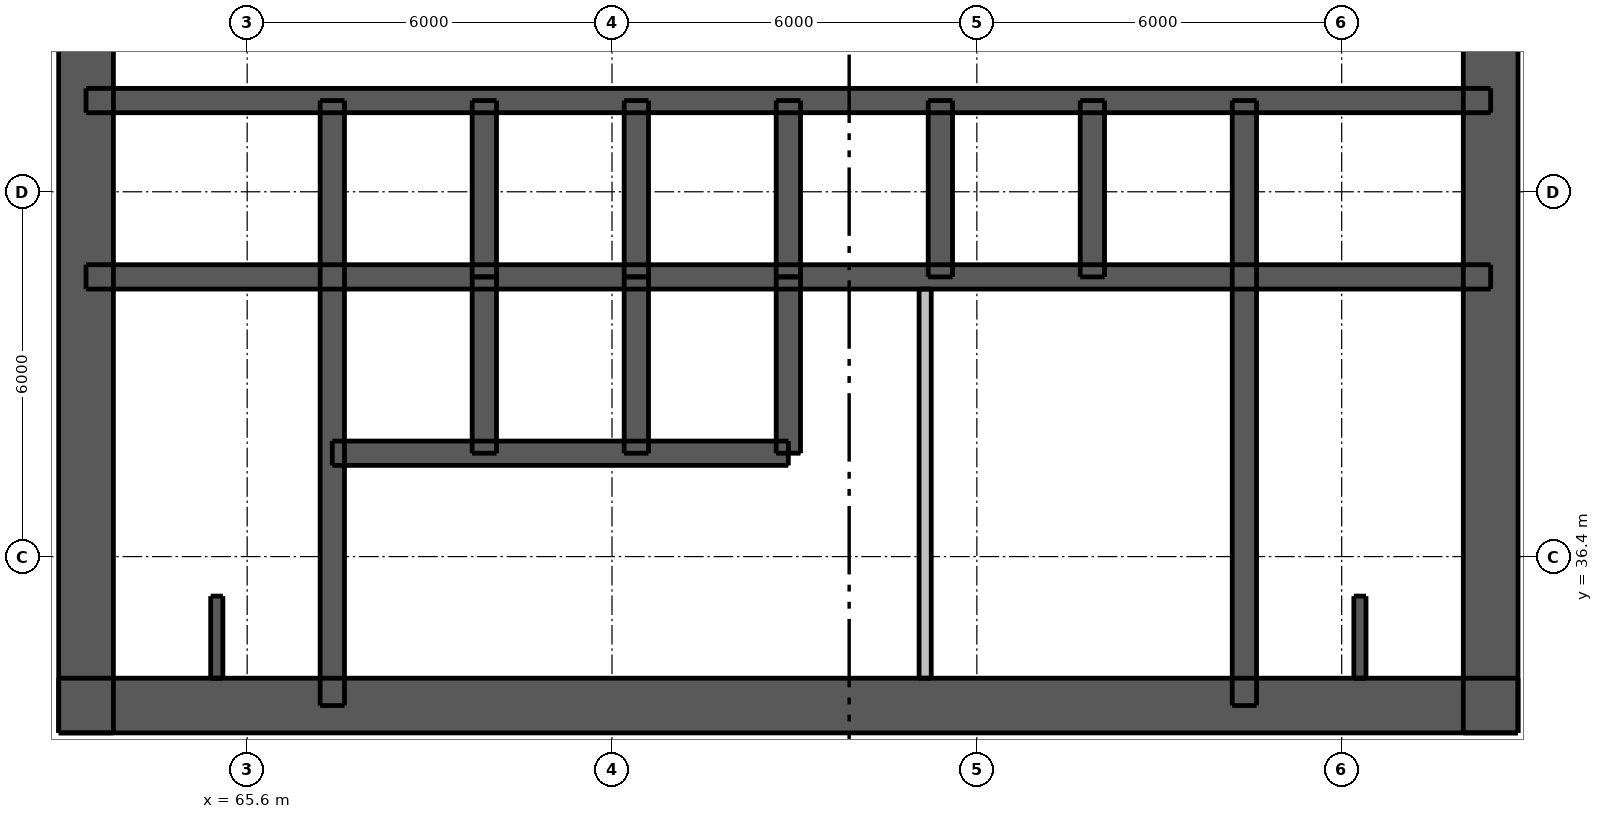
"""IFC4 building model, lengths in metres.
Left out: names, types, materials, properties, quantities, classifications, styles, units other than length and angle.
Written with IfcOpenShell. Run it as: python <this file> out.ifc"""

import sys

from ifc_helpers import new_model, si_unit, direction, frame, frame_2d, origin, place, context, subcontext, project, spatial, rectangle, extrude, element, fill, save


model = new_model("IFC4")
c1 = context("Model", 3, precision=1e-05, world=origin(), true_north=direction((0.0, 1.0)))
c2 = subcontext(c1, "Body", "Model", "MODEL_VIEW")
j1 = project(units=[si_unit("LENGTHUNIT", "METRE"), si_unit("PLANEANGLEUNIT", "RADIAN")], contexts=[c1])
p1 = place(None, origin())
s1 = spatial("IfcSite", under=j1, at=p1, CompositionType="ELEMENT")
p2 = place(p1, origin())
s2 = spatial("IfcBuilding", under=s1, at=p2, CompositionType="ELEMENT")
p3 = place(p2, frame((0.0, 0.0, 69.7)))
s3 = spatial("IfcBuildingStorey", under=s2, at=p3, CompositionType="ELEMENT", Elevation=69.7)
p4 = place(p3, frame((62.5, 33.95, 0.0), z_axis=(0.0, 0.0, 1.0), x_axis=(1.0, 0.0, 0.0)))
e1 = element("IfcWall", 1, at=p4, inside=s3, PredefinedType="SHEAR", context=c2, shape_type="SweptSolid", body=[
    extrude(rectangle(XDim=24.0, YDim=0.9, at=frame_2d((12.0, 0.0))), origin(), (0.0, 0.0, 1.0), 8.75),
])
p5 = place(p4, frame((3.0, 0.0, 0.0)))
e2 = element("IfcOpeningElement", 2, at=p5, cuts=e1, PredefinedType="OPENING", context=c2, shape_type="SweptSolid", body=[
    extrude(rectangle(XDim=1.1, YDim=2.1, at=frame_2d((0.55, 1.05))), frame((0.0, 0.46, 0.0), z_axis=(0.0, -1.0, 0.0), x_axis=(1.0, 0.0, 0.0)), (0.0, 0.0, 1.0), 0.92),
])
p6 = place(p4, frame((1.1, 0.0, 0.0)))
e3 = element("IfcOpeningElement", 3, at=p6, cuts=e1, PredefinedType="OPENING", context=c2, shape_type="SweptSolid", body=[
    extrude(rectangle(XDim=1.1, YDim=2.1, at=frame_2d((0.55, 1.05))), frame((0.0, 0.46, 0.0), z_axis=(0.0, -1.0, 0.0), x_axis=(1.0, 0.0, 0.0)), (0.0, 0.0, 1.0), 0.92),
])
p7 = place(p4, frame((21.8, 0.0, 0.0)))
e4 = element("IfcOpeningElement", 4, at=p7, cuts=e1, PredefinedType="OPENING", context=c2, shape_type="SweptSolid", body=[
    extrude(rectangle(XDim=1.1, YDim=2.1, at=frame_2d((0.55, 1.05))), frame((0.0, 0.46, 0.0), z_axis=(0.0, -1.0, 0.0), x_axis=(1.0, 0.0, 0.0)), (0.0, 0.0, 1.0), 0.92),
])
p8 = place(p4, frame((19.9, 0.0, 0.0)))
e5 = element("IfcOpeningElement", 5, at=p8, cuts=e1, PredefinedType="OPENING", context=c2, shape_type="SweptSolid", body=[
    extrude(rectangle(XDim=1.1, YDim=2.1, at=frame_2d((0.55, 1.05))), frame((0.0, 0.46, 0.0), z_axis=(0.0, -1.0, 0.0), x_axis=(1.0, 0.0, 0.0)), (0.0, 0.0, 1.0), 0.92),
])
p9 = place(p4, frame((7.05, 0.0, 0.0)))
e6 = element("IfcOpeningElement", 6, at=p9, cuts=e1, PredefinedType="OPENING", context=c2, shape_type="SweptSolid", body=[
    extrude(rectangle(XDim=1.1, YDim=2.1, at=frame_2d((0.55, 1.05))), frame((0.0, 0.46, 0.0), z_axis=(0.0, -1.0, 0.0), x_axis=(1.0, 0.0, 0.0)), (0.0, 0.0, 1.0), 0.92),
])
p10 = place(p4, frame((16.363, 0.0, 0.0)))
e7 = element("IfcOpeningElement", 7, at=p10, cuts=e1, PredefinedType="OPENING", context=c2, shape_type="SweptSolid", body=[
    extrude(rectangle(XDim=0.9, YDim=2.1, at=frame_2d((0.45, 1.05))), frame((0.0, 0.46, 0.0), z_axis=(0.0, -1.0, 0.0), x_axis=(1.0, 0.0, 0.0)), (0.0, 0.0, 1.0), 0.92),
])
p11 = place(p3, frame((62.95, 33.5, 0.0), z_axis=(0.0, 0.0, 1.0), x_axis=(0.0, 1.0, 0.0)))
e8 = element("IfcWall", 8, at=p11, inside=s3, PredefinedType="SHEAR", context=c2, shape_type="SweptSolid", body=[
    extrude(rectangle(XDim=24.0, YDim=0.9, at=frame_2d((12.0, 0.0))), origin(), (0.0, 0.0, 1.0), 8.75),
])
p12 = place(p11, frame((11.2, 0.0, 0.0)))
e9 = element("IfcOpeningElement", 9, at=p12, cuts=e8, PredefinedType="OPENING", context=c2, shape_type="SweptSolid", body=[
    extrude(rectangle(XDim=1.6, YDim=2.1, at=frame_2d((0.8, 1.05))), frame((0.0, 0.46, 0.0), z_axis=(0.0, -1.0, 0.0), x_axis=(1.0, 0.0, 0.0)), (0.0, 0.0, 1.0), 0.92),
])
p13 = place(p3, frame((86.05, 33.5, 0.0), z_axis=(0.0, 0.0, 1.0), x_axis=(0.0, 1.0, 0.0)))
e10 = element("IfcWall", 10, at=p13, inside=s3, PredefinedType="SHEAR", context=c2, shape_type="SweptSolid", body=[
    extrude(rectangle(XDim=24.0, YDim=0.9, at=frame_2d((12.0, 0.0))), origin(), (0.0, 0.0, 1.0), 8.75),
])
p14 = place(p13, frame((11.2, 0.0, 0.0)))
e11 = element("IfcOpeningElement", 11, at=p14, cuts=e10, PredefinedType="OPENING", context=c2, shape_type="SweptSolid", body=[
    extrude(rectangle(XDim=1.6, YDim=2.1, at=frame_2d((0.8, 1.05))), frame((0.0, 0.46, 0.0), z_axis=(0.0, -1.0, 0.0), x_axis=(1.0, 0.0, 0.0)), (0.0, 0.0, 1.0), 0.92),
])
p15 = place(p3, frame((62.95, 41.0, 0.0), z_axis=(0.0, 0.0, 1.0), x_axis=(1.0, 0.0, 0.0)))
e12 = element("IfcWall", 12, at=p15, inside=s3, PredefinedType="SHEAR", context=c2, shape_type="SweptSolid", body=[
    extrude(rectangle(XDim=23.1, YDim=0.4, at=frame_2d((11.55, 0.0))), origin(), (0.0, 0.0, 1.0), 8.75),
])
p16 = place(p3, frame((62.95, 43.9, 0.0), z_axis=(0.0, 0.0, 1.0), x_axis=(1.0, 0.0, 0.0)))
e13 = element("IfcWall", 13, at=p16, inside=s3, PredefinedType="SHEAR", context=c2, shape_type="SweptSolid", body=[
    extrude(rectangle(XDim=23.1, YDim=0.4, at=frame_2d((11.55, 0.0))), origin(), (0.0, 0.0, 1.0), 8.75),
])
p17 = place(p16, frame((1.7, 0.0, 0.0)))
e14 = element("IfcOpeningElement", 14, at=p17, cuts=e13, PredefinedType="OPENING", context=c2, shape_type="SweptSolid", body=[
    extrude(rectangle(XDim=0.9, YDim=2.1, at=frame_2d((0.45, 1.05))), frame((0.0, 0.21, 0.0), z_axis=(0.0, -1.0, 0.0), x_axis=(1.0, 0.0, 0.0)), (0.0, 0.0, 1.0), 0.42),
])
p18 = place(p16, frame((20.5, 0.0, 0.0)))
e15 = element("IfcOpeningElement", 15, at=p18, cuts=e13, PredefinedType="OPENING", context=c2, shape_type="SweptSolid", body=[
    extrude(rectangle(XDim=0.9, YDim=2.1, at=frame_2d((0.45, 1.05))), frame((0.0, 0.21, 0.0), z_axis=(0.0, -1.0, 0.0), x_axis=(1.0, 0.0, 0.0)), (0.0, 0.0, 1.0), 0.42),
])
p19 = place(p16, frame((4.75, 0.0, 0.0)))
e16 = element("IfcOpeningElement", 16, at=p19, cuts=e13, PredefinedType="OPENING", context=c2, shape_type="SweptSolid", body=[
    extrude(rectangle(XDim=1.1, YDim=2.1, at=frame_2d((0.55, 1.05))), frame((0.0, 0.21, 0.0), z_axis=(0.0, -1.0, 0.0), x_axis=(1.0, 0.0, 0.0)), (0.0, 0.0, 1.0), 0.42),
])
p20 = place(p16, frame((7.25, 0.0, 0.0)))
e17 = element("IfcOpeningElement", 17, at=p20, cuts=e13, PredefinedType="OPENING", context=c2, shape_type="SweptSolid", body=[
    extrude(rectangle(XDim=1.1, YDim=2.1, at=frame_2d((0.55, 1.05))), frame((0.0, 0.21, 0.0), z_axis=(0.0, -1.0, 0.0), x_axis=(1.0, 0.0, 0.0)), (0.0, 0.0, 1.0), 0.42),
])
p21 = place(p16, frame((9.75, 0.0, 0.0)))
e18 = element("IfcOpeningElement", 18, at=p21, cuts=e13, PredefinedType="OPENING", context=c2, shape_type="SweptSolid", body=[
    extrude(rectangle(XDim=1.1, YDim=2.1, at=frame_2d((0.55, 1.05))), frame((0.0, 0.21, 0.0), z_axis=(0.0, -1.0, 0.0), x_axis=(1.0, 0.0, 0.0)), (0.0, 0.0, 1.0), 0.42),
])
p22 = place(p16, frame((12.25, 0.0, 0.0)))
e19 = element("IfcOpeningElement", 19, at=p22, cuts=e13, PredefinedType="OPENING", context=c2, shape_type="SweptSolid", body=[
    extrude(rectangle(XDim=1.1, YDim=2.1, at=frame_2d((0.55, 1.05))), frame((0.0, 0.21, 0.0), z_axis=(0.0, -1.0, 0.0), x_axis=(1.0, 0.0, 0.0)), (0.0, 0.0, 1.0), 0.42),
])
p23 = place(p16, frame((14.75, 0.0, 0.0)))
e20 = element("IfcOpeningElement", 20, at=p23, cuts=e13, PredefinedType="OPENING", context=c2, shape_type="SweptSolid", body=[
    extrude(rectangle(XDim=1.1, YDim=2.1, at=frame_2d((0.55, 1.05))), frame((0.0, 0.21, 0.0), z_axis=(0.0, -1.0, 0.0), x_axis=(1.0, 0.0, 0.0)), (0.0, 0.0, 1.0), 0.42),
])
p24 = place(p16, frame((17.25, 0.0, 0.0)))
e21 = element("IfcOpeningElement", 21, at=p24, cuts=e13, PredefinedType="OPENING", context=c2, shape_type="SweptSolid", body=[
    extrude(rectangle(XDim=1.1, YDim=2.1, at=frame_2d((0.55, 1.05))), frame((0.0, 0.21, 0.0), z_axis=(0.0, -1.0, 0.0), x_axis=(1.0, 0.0, 0.0)), (0.0, 0.0, 1.0), 0.42),
])
for number, where, z_axis, x_axis in (
    (22, (67.0, 33.95, 0.0), (0.0, 0.0, 1.0), (0.0, 1.0, 0.0)),
    (23, (82.0, 33.95, 0.0), (0.0, 0.0, 1.0), (0.0, 1.0, 0.0)),
):
    element("IfcWall", number, at=place(p3, frame(where, z_axis=z_axis, x_axis=x_axis)), inside=s3, PredefinedType="SHEAR", context=c2, shape_type="SweptSolid", body=[
        extrude(rectangle(XDim=9.95, YDim=0.4, at=frame_2d((4.975, 0.0))), origin(), (0.0, 0.0, 1.0), 8.75),
    ])
for number, where, z_axis, x_axis in (
    (24, (69.5, 41.0, 0.0), (0.0, 0.0, 1.0), (0.0, 1.0, 0.0)),
    (25, (72.0, 41.0, 0.0), (0.0, 0.0, 1.0), (0.0, 1.0, 0.0)),
    (26, (74.5, 41.0, 0.0), (0.0, 0.0, 1.0), (0.0, 1.0, 0.0)),
    (27, (77.0, 41.0, 0.0), (0.0, 0.0, 1.0), (0.0, 1.0, 0.0)),
    (28, (79.5, 41.0, 0.0), (0.0, 0.0, 1.0), (0.0, 1.0, 0.0)),
):
    element("IfcWall", number, at=place(p3, frame(where, z_axis=z_axis, x_axis=x_axis)), inside=s3, PredefinedType="SHEAR", context=c2, shape_type="SweptSolid", body=[
        extrude(rectangle(XDim=2.9, YDim=0.4, at=frame_2d((1.45, 0.0))), origin(), (0.0, 0.0, 1.0), 8.75),
    ])
p25 = place(p3, frame((67.0, 38.1, 0.0), z_axis=(0.0, 0.0, 1.0), x_axis=(1.0, 0.0, 0.0)))
e29 = element("IfcWall", 29, at=p25, inside=s3, PredefinedType="SHEAR", context=c2, shape_type="SweptSolid", body=[
    extrude(rectangle(XDim=7.5, YDim=0.4, at=frame_2d((3.75, 0.0))), origin(), (0.0, 0.0, 1.0), 8.75),
])
p26 = place(p25, frame((0.7, 0.0, 0.0)))
e30 = element("IfcOpeningElement", 30, at=p26, cuts=e29, PredefinedType="OPENING", context=c2, shape_type="SweptSolid", body=[
    extrude(rectangle(XDim=1.1, YDim=2.1, at=frame_2d((0.55, 1.05))), frame((0.0, 0.21, 0.0), z_axis=(0.0, -1.0, 0.0), x_axis=(1.0, 0.0, 0.0)), (0.0, 0.0, 1.0), 0.42),
])
p27 = place(p25, frame((3.2, 0.0, 0.0)))
e31 = element("IfcOpeningElement", 31, at=p27, cuts=e29, PredefinedType="OPENING", context=c2, shape_type="SweptSolid", body=[
    extrude(rectangle(XDim=1.1, YDim=2.1, at=frame_2d((0.55, 1.05))), frame((0.0, 0.21, 0.0), z_axis=(0.0, -1.0, 0.0), x_axis=(1.0, 0.0, 0.0)), (0.0, 0.0, 1.0), 0.42),
])
p28 = place(p25, frame((5.65, 0.0, 0.0)))
e32 = element("IfcOpeningElement", 32, at=p28, cuts=e29, PredefinedType="OPENING", context=c2, shape_type="SweptSolid", body=[
    extrude(rectangle(XDim=1.2, YDim=2.1, at=frame_2d((0.6, 1.05))), frame((0.0, 0.21, 0.0), z_axis=(0.0, -1.0, 0.0), x_axis=(1.0, 0.0, 0.0)), (0.0, 0.0, 1.0), 0.42),
])
for number, where, z_axis, x_axis in (
    (33, (69.5, 38.1, 0.0), (0.0, 0.0, 1.0), (0.0, 1.0, 0.0)),
    (34, (72.0, 38.1, 0.0), (0.0, 0.0, 1.0), (0.0, 1.0, 0.0)),
    (35, (74.5, 38.1, 0.0), (0.0, 0.0, 1.0), (0.0, 1.0, 0.0)),
):
    element("IfcWall", number, at=place(p3, frame(where, z_axis=z_axis, x_axis=x_axis)), inside=s3, PredefinedType="SHEAR", context=c2, shape_type="SweptSolid", body=[
        extrude(rectangle(XDim=2.9, YDim=0.4, at=frame_2d((1.45, 0.0))), origin(), (0.0, 0.0, 1.0), 8.75),
    ])
p29 = place(p3, frame((76.75, 34.4, 0.0), z_axis=(0.0, 0.0, 1.0), x_axis=(0.0, 1.0, 0.0)))
e36 = element("IfcWall", 36, at=p29, inside=s3, PredefinedType="PLUMBINGWALL", context=c2, shape_type="SweptSolid", body=[
    extrude(rectangle(XDim=6.4, YDim=0.2, at=frame_2d((3.2, 0.0))), origin(), (0.0, 0.0, 1.0), 8.75),
])
for number, where, z_axis, x_axis in (
    (37, (65.1, 34.4, 0.0), (0.0, 0.0, 1.0), (0.0, 1.0, 0.0)),
    (38, (83.9, 34.4, 0.0), (0.0, 0.0, 1.0), (0.0, 1.0, 0.0)),
):
    element("IfcWall", number, at=place(p3, frame(where, z_axis=z_axis, x_axis=x_axis)), inside=s3, PredefinedType="SHEAR", context=c2, shape_type="SweptSolid", body=[
        extrude(rectangle(XDim=1.35, YDim=0.2, at=frame_2d((0.675, 0.0))), origin(), (0.0, 0.0, 1.0), 8.75),
    ])
p30 = place(p5, origin())
e39 = element("IfcDoor", 39, at=p30, inside=s3, OperationType="SINGLE_SWING_LEFT", PredefinedType="DOOR", context=c2, shape_type="SweptSolid", body=[
    extrude(rectangle(XDim=1.1, YDim=2.1, at=frame_2d((0.55, 1.05))), frame((0.0, 0.438, 0.0), z_axis=(0.0, -1.0, 0.0), x_axis=(1.0, 0.0, 0.0)), (0.0, 0.0, 1.0), 0.05),
])
fill(e2, e39)
p31 = place(p6, origin())
e40 = element("IfcDoor", 40, at=p31, inside=s3, OperationType="SINGLE_SWING_LEFT", PredefinedType="DOOR", context=c2, shape_type="SweptSolid", body=[
    extrude(rectangle(XDim=1.1, YDim=2.1, at=frame_2d((0.55, 1.05))), frame((0.0, 0.438, 0.0), z_axis=(0.0, -1.0, 0.0), x_axis=(1.0, 0.0, 0.0)), (0.0, 0.0, 1.0), 0.05),
])
fill(e3, e40)
p32 = place(p7, origin())
e41 = element("IfcDoor", 41, at=p32, inside=s3, OperationType="SINGLE_SWING_RIGHT", PredefinedType="DOOR", context=c2, shape_type="SweptSolid", body=[
    extrude(rectangle(XDim=1.1, YDim=2.1, at=frame_2d((0.55, 1.05))), frame((0.0, 0.438, 0.0), z_axis=(0.0, -1.0, 0.0), x_axis=(1.0, 0.0, 0.0)), (0.0, 0.0, 1.0), 0.05),
])
fill(e4, e41)
p33 = place(p8, origin())
e42 = element("IfcDoor", 42, at=p33, inside=s3, OperationType="SINGLE_SWING_RIGHT", PredefinedType="DOOR", context=c2, shape_type="SweptSolid", body=[
    extrude(rectangle(XDim=1.1, YDim=2.1, at=frame_2d((0.55, 1.05))), frame((0.0, 0.438, 0.0), z_axis=(0.0, -1.0, 0.0), x_axis=(1.0, 0.0, 0.0)), (0.0, 0.0, 1.0), 0.05),
])
fill(e5, e42)
p34 = place(p9, origin())
e43 = element("IfcDoor", 43, at=p34, inside=s3, OperationType="SINGLE_SWING_LEFT", PredefinedType="DOOR", context=c2, shape_type="SweptSolid", body=[
    extrude(rectangle(XDim=1.1, YDim=2.1, at=frame_2d((0.55, 1.05))), frame((0.0, 0.438, 0.0), z_axis=(0.0, -1.0, 0.0), x_axis=(1.0, 0.0, 0.0)), (0.0, 0.0, 1.0), 0.05),
])
fill(e6, e43)
p35 = place(p10, origin())
e44 = element("IfcDoor", 44, at=p35, inside=s3, OperationType="SINGLE_SWING_LEFT", PredefinedType="DOOR", context=c2, shape_type="SweptSolid", body=[
    extrude(rectangle(XDim=0.9, YDim=2.1, at=frame_2d((0.45, 1.05))), frame((0.0, 0.438, 0.0), z_axis=(0.0, -1.0, 0.0), x_axis=(1.0, 0.0, 0.0)), (0.0, 0.0, 1.0), 0.05),
])
fill(e7, e44)
p36 = place(p17, origin())
e45 = element("IfcDoor", 45, at=p36, inside=s3, OperationType="SINGLE_SWING_LEFT", PredefinedType="DOOR", context=c2, shape_type="SweptSolid", body=[
    extrude(rectangle(XDim=0.9, YDim=2.1, at=frame_2d((0.45, 1.05))), frame((0.0, -0.138, 0.0), z_axis=(0.0, -1.0, 0.0), x_axis=(1.0, 0.0, 0.0)), (0.0, 0.0, 1.0), 0.05),
])
fill(e14, e45)
p37 = place(p18, origin())
e46 = element("IfcDoor", 46, at=p37, inside=s3, OperationType="SINGLE_SWING_LEFT", PredefinedType="DOOR", context=c2, shape_type="SweptSolid", body=[
    extrude(rectangle(XDim=0.9, YDim=2.1, at=frame_2d((0.45, 1.05))), frame((0.0, -0.138, 0.0), z_axis=(0.0, -1.0, 0.0), x_axis=(1.0, 0.0, 0.0)), (0.0, 0.0, 1.0), 0.05),
])
fill(e15, e46)
p38 = place(p19, origin())
e47 = element("IfcDoor", 47, at=p38, inside=s3, OperationType="DOUBLE_DOOR_SLIDING", PredefinedType="DOOR", context=c2, shape_type="SweptSolid", body=[
    extrude(rectangle(XDim=1.1, YDim=2.1, at=frame_2d((0.55, 1.05))), frame((0.0, 0.025, 0.0), z_axis=(0.0, -1.0, 0.0), x_axis=(1.0, 0.0, 0.0)), (0.0, 0.0, 1.0), 0.05),
])
fill(e16, e47)
p39 = place(p20, origin())
e48 = element("IfcDoor", 48, at=p39, inside=s3, OperationType="DOUBLE_DOOR_SLIDING", PredefinedType="DOOR", context=c2, shape_type="SweptSolid", body=[
    extrude(rectangle(XDim=1.1, YDim=2.1, at=frame_2d((0.55, 1.05))), frame((0.0, 0.025, 0.0), z_axis=(0.0, -1.0, 0.0), x_axis=(1.0, 0.0, 0.0)), (0.0, 0.0, 1.0), 0.05),
])
fill(e17, e48)
p40 = place(p21, origin())
e49 = element("IfcDoor", 49, at=p40, inside=s3, OperationType="DOUBLE_DOOR_SLIDING", PredefinedType="DOOR", context=c2, shape_type="SweptSolid", body=[
    extrude(rectangle(XDim=1.1, YDim=2.1, at=frame_2d((0.55, 1.05))), frame((0.0, 0.025, 0.0), z_axis=(0.0, -1.0, 0.0), x_axis=(1.0, 0.0, 0.0)), (0.0, 0.0, 1.0), 0.05),
])
fill(e18, e49)
p41 = place(p22, origin())
e50 = element("IfcDoor", 50, at=p41, inside=s3, OperationType="DOUBLE_DOOR_SLIDING", PredefinedType="DOOR", context=c2, shape_type="SweptSolid", body=[
    extrude(rectangle(XDim=1.1, YDim=2.1, at=frame_2d((0.55, 1.05))), frame((0.0, 0.025, 0.0), z_axis=(0.0, -1.0, 0.0), x_axis=(1.0, 0.0, 0.0)), (0.0, 0.0, 1.0), 0.05),
])
fill(e19, e50)
p42 = place(p23, origin())
e51 = element("IfcDoor", 51, at=p42, inside=s3, OperationType="DOUBLE_DOOR_SLIDING", PredefinedType="DOOR", context=c2, shape_type="SweptSolid", body=[
    extrude(rectangle(XDim=1.1, YDim=2.1, at=frame_2d((0.55, 1.05))), frame((0.0, 0.025, 0.0), z_axis=(0.0, -1.0, 0.0), x_axis=(1.0, 0.0, 0.0)), (0.0, 0.0, 1.0), 0.05),
])
fill(e20, e51)
p43 = place(p24, origin())
e52 = element("IfcDoor", 52, at=p43, inside=s3, OperationType="DOUBLE_DOOR_SLIDING", PredefinedType="DOOR", context=c2, shape_type="SweptSolid", body=[
    extrude(rectangle(XDim=1.1, YDim=2.1, at=frame_2d((0.55, 1.05))), frame((0.0, 0.025, 0.0), z_axis=(0.0, -1.0, 0.0), x_axis=(1.0, 0.0, 0.0)), (0.0, 0.0, 1.0), 0.05),
])
fill(e21, e52)
p44 = place(p26, origin())
e53 = element("IfcDoor", 53, at=p44, inside=s3, OperationType="DOUBLE_DOOR_SLIDING", PredefinedType="DOOR", context=c2, shape_type="SweptSolid", body=[
    extrude(rectangle(XDim=1.1, YDim=2.1, at=frame_2d((0.55, 1.05))), frame((0.0, 0.025, 0.0), z_axis=(0.0, -1.0, 0.0), x_axis=(1.0, 0.0, 0.0)), (0.0, 0.0, 1.0), 0.05),
])
fill(e30, e53)
p45 = place(p27, origin())
e54 = element("IfcDoor", 54, at=p45, inside=s3, OperationType="DOUBLE_DOOR_SLIDING", PredefinedType="DOOR", context=c2, shape_type="SweptSolid", body=[
    extrude(rectangle(XDim=1.1, YDim=2.1, at=frame_2d((0.55, 1.05))), frame((0.0, 0.025, 0.0), z_axis=(0.0, -1.0, 0.0), x_axis=(1.0, 0.0, 0.0)), (0.0, 0.0, 1.0), 0.05),
])
fill(e31, e54)
p46 = place(p28, origin())
e55 = element("IfcDoor", 55, at=p46, inside=s3, OperationType="DOUBLE_DOOR_SLIDING", PredefinedType="DOOR", context=c2, shape_type="SweptSolid", body=[
    extrude(rectangle(XDim=1.2, YDim=2.1, at=frame_2d((0.6, 1.05))), frame((0.0, 0.025, 0.0), z_axis=(0.0, -1.0, 0.0), x_axis=(1.0, 0.0, 0.0)), (0.0, 0.0, 1.0), 0.05),
])
fill(e32, e55)
save(model, sys.argv[1])
